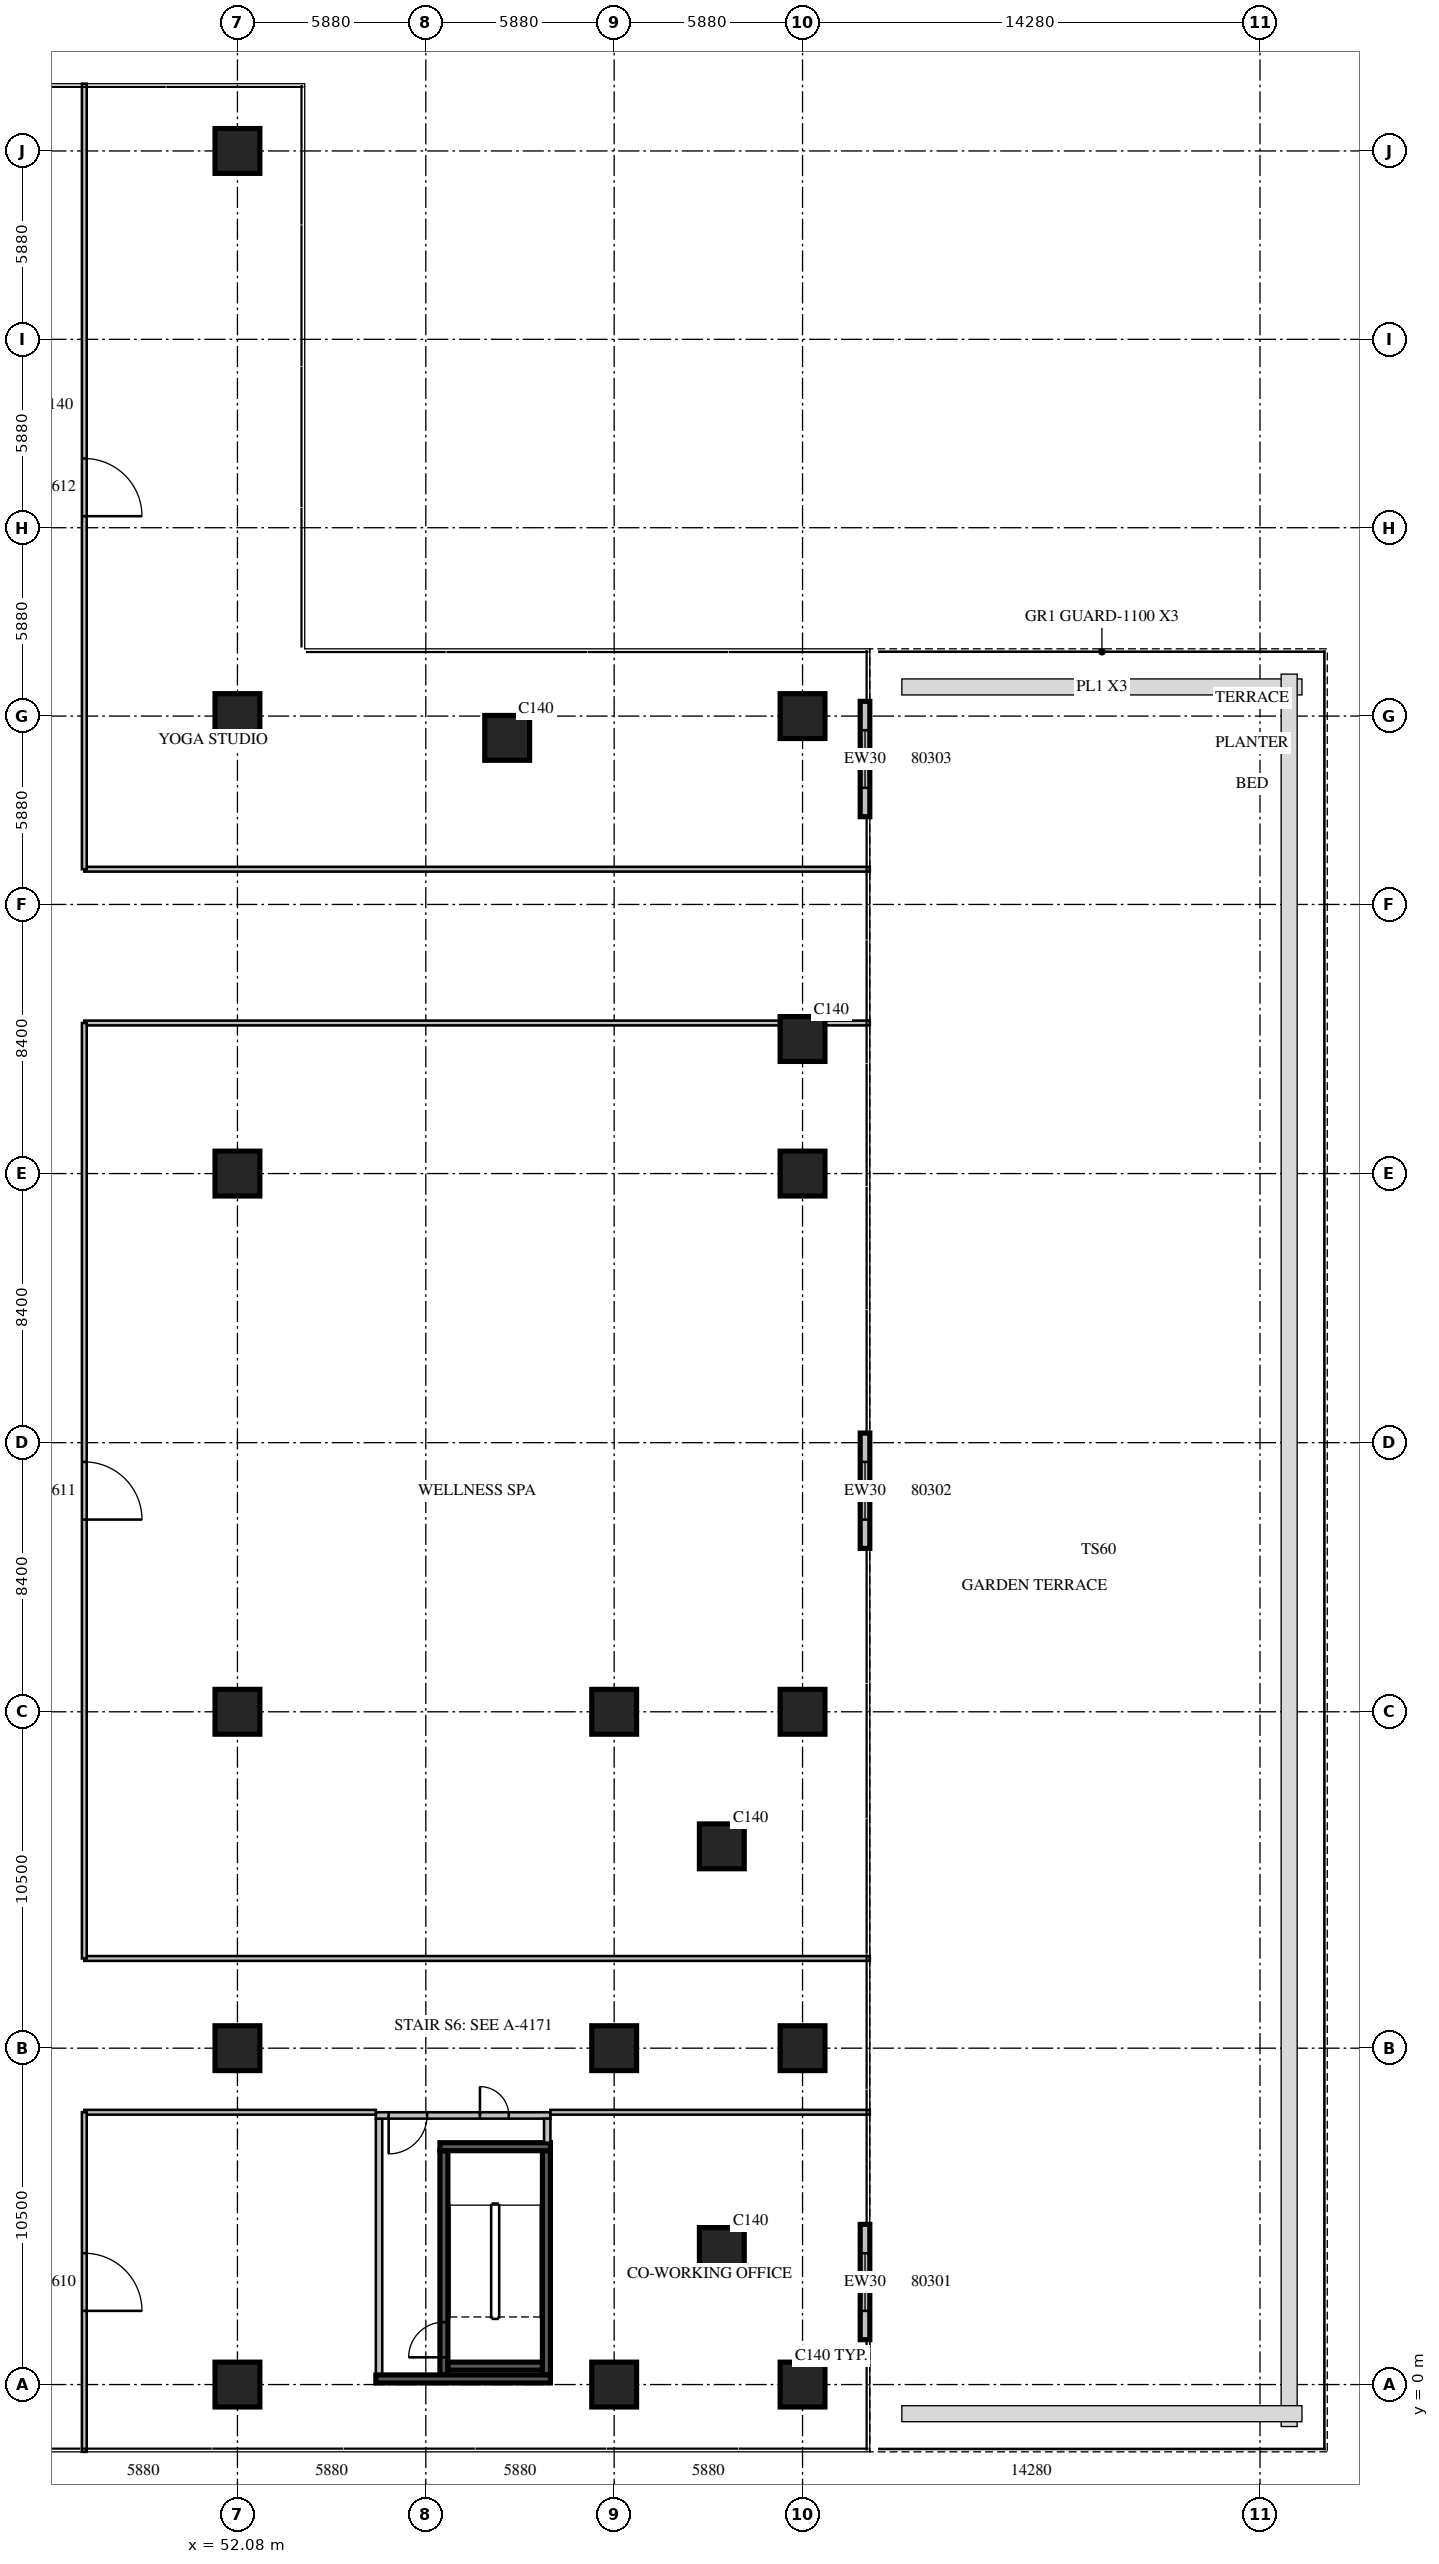
"""IFC4 building model, lengths in metres.
Left out: names, types, materials, properties, quantities, classifications, styles, units other than length and angle.
Written with IfcOpenShell. Run it as: python <this file> out.ifc"""

import sys

from ifc_helpers import new_model, si_unit, direction, frame, frame_2d, origin, origin_2d, place, context, subcontext, project, spatial, rectangle, extrude, source, transform, mapped, element, fill, save


model = new_model("IFC4")
c1 = context("Model", 3, precision=1e-05, world=origin(), true_north=direction((0.0, 1.0)))
c2 = subcontext(c1, "Body", "Model", "MODEL_VIEW")
j1 = project(units=[si_unit("LENGTHUNIT", "METRE"), si_unit("PLANEANGLEUNIT", "RADIAN")], contexts=[c1])
p1 = place(None, origin())
s1 = spatial("IfcSite", under=j1, at=p1, CompositionType="ELEMENT")
p2 = place(p1, origin())
s2 = spatial("IfcBuilding", under=s1, at=p2, CompositionType="ELEMENT")
p3 = place(p2, frame((0.0, 0.0, 18.3)))
s3 = spatial("IfcBuildingStorey", under=s2, at=p3, CompositionType="ELEMENT", Elevation=18.3)
m1 = source(origin(), c2, "Body", "SweptSolid", [
    extrude(rectangle(XDim=1.4, YDim=1.4, at=origin_2d()), origin(), (0.0, 0.0, 1.0), 5.4),
])
for number, where, z_axis, x_axis in (
    (1, (52.08, 0.0, 0.0), (0.0, 0.0, 1.0), (1.0, 0.0, 0.0)),
    (2, (52.08, 10.5, 0.0), (0.0, 0.0, 1.0), (1.0, 0.0, 0.0)),
    (3, (52.08, 21.0, 0.0), (0.0, 0.0, 1.0), (1.0, 0.0, 0.0)),
    (4, (52.08, 37.8, 0.0), (0.0, 0.0, 1.0), (1.0, 0.0, 0.0)),
    (5, (52.08, 52.08, 0.0), (0.0, 0.0, 1.0), (1.0, 0.0, 0.0)),
    (6, (52.08, 69.72, 0.0), (0.0, 0.0, 1.0), (1.0, 0.0, 0.0)),
    (7, (60.5, 51.4, 0.0), (0.0, 0.0, 1.0), (1.0, 0.0, 0.0)),
    (8, (63.84, 0.0, 0.0), (0.0, 0.0, 1.0), (1.0, 0.0, 0.0)),
    (9, (63.84, 10.5, 0.0), (0.0, 0.0, 1.0), (1.0, 0.0, 0.0)),
    (10, (63.84, 21.0, 0.0), (0.0, 0.0, 1.0), (1.0, 0.0, 0.0)),
    (11, (67.2, 4.2, 0.0), (0.0, 0.0, 1.0), (1.0, 0.0, 0.0)),
    (12, (67.2, 16.8, 0.0), (0.0, 0.0, 1.0), (1.0, 0.0, 0.0)),
    (13, (69.72, 0.0, 0.0), (0.0, 0.0, 1.0), (1.0, 0.0, 0.0)),
    (14, (69.72, 10.5, 0.0), (0.0, 0.0, 1.0), (1.0, 0.0, 0.0)),
    (15, (69.72, 21.0, 0.0), (0.0, 0.0, 1.0), (1.0, 0.0, 0.0)),
    (16, (69.72, 37.8, 0.0), (0.0, 0.0, 1.0), (1.0, 0.0, 0.0)),
    (17, (69.72, 42.0, 0.0), (0.0, 0.0, 1.0), (1.0, 0.0, 0.0)),
    (18, (69.72, 52.08, 0.0), (0.0, 0.0, 1.0), (1.0, 0.0, 0.0)),
):
    element("IfcColumn", number, at=place(p3, frame(where, z_axis=z_axis, x_axis=x_axis)), inside=s3, PredefinedType="COLUMN", context=c2, shape_type="MappedRepresentation", body=[
        mapped(m1, transform((0.0, 0.0, 0.0), scale=1.0)),
    ])
m2 = source(origin(), c2, "Body", "SweptSolid", [
    extrude(rectangle(XDim=3.6, YDim=0.3, at=frame_2d((1.8, 0.0))), origin(), (0.0, 0.0, 1.0), 4.8),
])
p4 = place(p3, frame((71.67, 1.4, 0.0), z_axis=(0.0, 0.0, 1.0), x_axis=(0.0, 1.0, 0.0)))
e19 = element("IfcWall", 19, at=p4, inside=s3, PredefinedType="STANDARD", context=c2, shape_type="MappedRepresentation", body=[
    mapped(m2, transform((0.0, 0.0, 0.0), scale=1.0)),
])
m3 = source(origin(), c2, "Body", "SweptSolid", [
    extrude(rectangle(XDim=1.8, YDim=2.4, at=frame_2d((0.9, 1.2))), frame((0.0, 0.16, 0.0), z_axis=(0.0, -1.0, 0.0), x_axis=(1.0, 0.0, 0.0)), (0.0, 0.0, 1.0), 0.32),
])
p5 = place(p4, frame((0.9, 0.0, 0.0)))
e20 = element("IfcOpeningElement", 20, at=p5, cuts=e19, PredefinedType="OPENING", context=c2, shape_type="MappedRepresentation", body=[
    mapped(m3, transform((0.0, 0.0, 0.0), scale=1.0)),
])
p6 = place(p3, frame((71.67, 26.1, 0.0), z_axis=(0.0, 0.0, 1.0), x_axis=(0.0, 1.0, 0.0)))
e21 = element("IfcWall", 21, at=p6, inside=s3, PredefinedType="STANDARD", context=c2, shape_type="MappedRepresentation", body=[
    mapped(m2, transform((0.0, 0.0, 0.0), scale=1.0)),
])
p7 = place(p6, frame((0.9, 0.0, 0.0)))
e22 = element("IfcOpeningElement", 22, at=p7, cuts=e21, PredefinedType="OPENING", context=c2, shape_type="MappedRepresentation", body=[
    mapped(m3, transform((0.0, 0.0, 0.0), scale=1.0)),
])
p8 = place(p3, frame((71.67, 48.94, 0.0), z_axis=(0.0, 0.0, 1.0), x_axis=(0.0, 1.0, 0.0)))
e23 = element("IfcWall", 23, at=p8, inside=s3, PredefinedType="STANDARD", context=c2, shape_type="MappedRepresentation", body=[
    mapped(m2, transform((0.0, 0.0, 0.0), scale=1.0)),
])
p9 = place(p8, frame((0.9, 0.0, 0.0)))
e24 = element("IfcOpeningElement", 24, at=p9, cuts=e23, PredefinedType="OPENING", context=c2, shape_type="MappedRepresentation", body=[
    mapped(m3, transform((0.0, 0.0, 0.0), scale=1.0)),
])
m4 = source(origin(), c2, "Body", "SweptSolid", [
    extrude(rectangle(XDim=7.0, YDim=0.25, at=frame_2d((3.5, 0.0))), origin(), (0.0, 0.0, 1.0), 4.8),
])
p10 = place(p3, frame((58.525, 0.3, 0.0), z_axis=(0.0, 0.0, 1.0), x_axis=(0.0, 1.0, 0.0)))
e25 = element("IfcWall", 25, at=p10, inside=s3, PredefinedType="SOLIDWALL", context=c2, shape_type="MappedRepresentation", body=[
    mapped(m4, transform((0.0, 0.0, 0.0), scale=1.0)),
])
m5 = source(origin(), c2, "Body", "SweptSolid", [
    extrude(rectangle(XDim=1.1, YDim=2.1, at=frame_2d((0.55, 1.05))), frame((0.0, 0.135, 0.0), z_axis=(0.0, -1.0, 0.0), x_axis=(1.0, 0.0, 0.0)), (0.0, 0.0, 1.0), 0.27),
])
p11 = place(p10, frame((0.55, 0.0, 0.0)))
e26 = element("IfcOpeningElement", 26, at=p11, cuts=e25, PredefinedType="OPENING", context=c2, shape_type="MappedRepresentation", body=[
    mapped(m5, transform((0.0, 0.0, 0.0), scale=1.0)),
])
p12 = place(p3, frame((61.725, 0.3, 0.0), z_axis=(0.0, 0.0, 1.0), x_axis=(0.0, 1.0, 0.0)))
e27 = element("IfcWall", 27, at=p12, inside=s3, PredefinedType="SOLIDWALL", context=c2, shape_type="MappedRepresentation", body=[
    mapped(m4, transform((0.0, 0.0, 0.0), scale=1.0)),
])
m6 = source(origin(), c2, "Body", "SweptSolid", [
    extrude(rectangle(XDim=3.45, YDim=0.25, at=frame_2d((1.725, 0.0))), origin(), (0.0, 0.0, 1.0), 4.8),
])
p13 = place(p3, frame((58.4, 7.425, 0.0), z_axis=(0.0, 0.0, 1.0), x_axis=(1.0, 0.0, 0.0)))
e28 = element("IfcWall", 28, at=p13, inside=s3, PredefinedType="SOLIDWALL", context=c2, shape_type="MappedRepresentation", body=[
    mapped(m6, transform((0.0, 0.0, 0.0), scale=1.0)),
])
m7 = source(origin(), c2, "Body", "SweptSolid", [
    extrude(rectangle(XDim=2.95, YDim=0.25, at=frame_2d((1.475, 0.0))), origin(), (0.0, 0.0, 1.0), 4.8),
])
p14 = place(p3, frame((58.65, 0.575, 0.0), z_axis=(0.0, 0.0, 1.0), x_axis=(1.0, 0.0, 0.0)))
e29 = element("IfcWall", 29, at=p14, inside=s3, PredefinedType="SOLIDWALL", context=c2, shape_type="MappedRepresentation", body=[
    mapped(m7, transform((0.0, 0.0, 0.0), scale=1.0)),
])
m8 = source(origin(), c2, "Body", "SweptSolid", [
    extrude(rectangle(XDim=8.0, YDim=0.2, at=frame_2d((4.0, 0.0))), origin(), (0.0, 0.0, 1.0), 4.8),
])
p15 = place(p3, frame((56.5, 0.3, 0.0), z_axis=(0.0, 0.0, 1.0), x_axis=(0.0, 1.0, 0.0)))
e30 = element("IfcWall", 30, at=p15, inside=s3, PredefinedType="PARTITIONING", context=c2, shape_type="MappedRepresentation", body=[
    mapped(m8, transform((0.0, 0.0, 0.0), scale=1.0)),
])
m9 = source(origin(), c2, "Body", "SweptSolid", [
    extrude(rectangle(XDim=5.45, YDim=0.2, at=frame_2d((2.725, 0.0))), origin(), (0.0, 0.0, 1.0), 4.8),
])
p16 = place(p3, frame((56.4, 8.4, 0.0), z_axis=(0.0, 0.0, 1.0), x_axis=(1.0, 0.0, 0.0)))
e31 = element("IfcWall", 31, at=p16, inside=s3, PredefinedType="PARTITIONING", context=c2, shape_type="MappedRepresentation", body=[
    mapped(m9, transform((0.0, 0.0, 0.0), scale=1.0)),
])
m10 = source(origin(), c2, "Body", "SweptSolid", [
    extrude(rectangle(XDim=1.2, YDim=2.1, at=frame_2d((0.6, 1.05))), frame((0.0, 0.11, 0.0), z_axis=(0.0, -1.0, 0.0), x_axis=(1.0, 0.0, 0.0)), (0.0, 0.0, 1.0), 0.22),
])
p17 = place(p16, frame((0.4, 0.0, 0.0)))
e32 = element("IfcOpeningElement", 32, at=p17, cuts=e31, PredefinedType="OPENING", context=c2, shape_type="MappedRepresentation", body=[
    mapped(m10, transform((0.0, 0.0, 0.0), scale=1.0)),
])
m11 = source(origin(), c2, "Body", "SweptSolid", [
    extrude(rectangle(XDim=0.9, YDim=2.1, at=frame_2d((0.45, 1.05))), frame((0.0, 0.11, 0.0), z_axis=(0.0, -1.0, 0.0), x_axis=(1.0, 0.0, 0.0)), (0.0, 0.0, 1.0), 0.22),
])
p18 = place(p16, frame((3.25, 0.0, 0.0)))
e33 = element("IfcOpeningElement", 33, at=p18, cuts=e31, PredefinedType="OPENING", context=c2, shape_type="MappedRepresentation", body=[
    mapped(m11, transform((0.0, 0.0, 0.0), scale=1.0)),
])
m12 = source(origin(), c2, "Body", "SweptSolid", [
    extrude(rectangle(XDim=0.75, YDim=0.2, at=frame_2d((0.375, 0.0))), origin(), (0.0, 0.0, 1.0), 4.8),
])
p19 = place(p3, frame((61.75, 7.55, 0.0), z_axis=(0.0, 0.0, 1.0), x_axis=(0.0, 1.0, 0.0)))
e34 = element("IfcWall", 34, at=p19, inside=s3, PredefinedType="PARTITIONING", context=c2, shape_type="MappedRepresentation", body=[
    mapped(m12, transform((0.0, 0.0, 0.0), scale=1.0)),
])
m13 = source(origin(), c2, "Body", "SweptSolid", [
    extrude(rectangle(XDim=5.45, YDim=0.25, at=frame_2d((2.725, 0.0))), origin(), (0.0, 0.0, 1.0), 4.8),
])
p20 = place(p3, frame((56.4, 0.175, 0.0), z_axis=(0.0, 0.0, 1.0), x_axis=(1.0, 0.0, 0.0)))
e35 = element("IfcWall", 35, at=p20, inside=s3, PredefinedType="SOLIDWALL", context=c2, shape_type="MappedRepresentation", body=[
    mapped(m13, transform((0.0, 0.0, 0.0), scale=1.0)),
])
m14 = source(origin(), c2, "Body", "SweptSolid", [
    extrude(rectangle(XDim=9.1, YDim=0.15, at=frame_2d((4.55, 0.0))), origin(), (0.0, 0.0, 1.0), 4.8),
])
p21 = place(p3, frame((47.3, 8.5, 0.0), z_axis=(0.0, 0.0, 1.0), x_axis=(1.0, 0.0, 0.0)))
e36 = element("IfcWall", 36, at=p21, inside=s3, PredefinedType="PARTITIONING", context=c2, shape_type="MappedRepresentation", body=[
    mapped(m14, transform((0.0, 0.0, 0.0), scale=1.0)),
])
p22 = place(p3, frame((61.85, 8.5, 0.0), z_axis=(0.0, 0.0, 1.0), x_axis=(1.0, 0.0, 0.0)))
e37 = element("IfcWall", 37, at=p22, inside=s3, PredefinedType="PARTITIONING", context=c2, shape_type="SweptSolid", body=[
    extrude(rectangle(XDim=9.97, YDim=0.15, at=frame_2d((4.985, 0.0))), origin(), (0.0, 0.0, 1.0), 4.8),
])
m15 = source(origin(), c2, "Body", "SweptSolid", [
    extrude(rectangle(XDim=24.52, YDim=0.15, at=frame_2d((12.26, 0.0))), origin(), (0.0, 0.0, 1.0), 4.8),
])
for number, where, z_axis, x_axis in (
    (38, (47.3, 13.3, 0.0), (0.0, 0.0, 1.0), (1.0, 0.0, 0.0)),
    (39, (47.3, 42.5, 0.0), (0.0, 0.0, 1.0), (1.0, 0.0, 0.0)),
    (40, (47.3, 47.3, 0.0), (0.0, 0.0, 1.0), (1.0, 0.0, 0.0)),
):
    element("IfcWall", number, at=place(p3, frame(where, z_axis=z_axis, x_axis=x_axis)), inside=s3, PredefinedType="PARTITIONING", context=c2, shape_type="MappedRepresentation", body=[
        mapped(m15, transform((0.0, 0.0, 0.0), scale=1.0)),
    ])
m16 = source(origin(), c2, "Body", "SweptSolid", [
    extrude(rectangle(XDim=10.6, YDim=0.15, at=frame_2d((5.3, 0.0))), origin(), (0.0, 0.0, 1.0), 4.8),
])
p23 = place(p3, frame((47.3, -2.1, 0.0), z_axis=(0.0, 0.0, 1.0), x_axis=(0.0, 1.0, 0.0)))
e41 = element("IfcWall", 41, at=p23, inside=s3, PredefinedType="PARTITIONING", context=c2, shape_type="MappedRepresentation", body=[
    mapped(m16, transform((0.0, 0.0, 0.0), scale=1.0)),
])
m17 = source(origin(), c2, "Body", "SweptSolid", [
    extrude(rectangle(XDim=1.8, YDim=2.1, at=frame_2d((0.9, 1.05))), frame((0.0, 0.085, 0.0), z_axis=(0.0, -1.0, 0.0), x_axis=(1.0, 0.0, 0.0)), (0.0, 0.0, 1.0), 0.17),
])
p24 = place(p23, frame((4.4, 0.0, 0.0)))
e42 = element("IfcOpeningElement", 42, at=p24, cuts=e41, PredefinedType="OPENING", context=c2, shape_type="MappedRepresentation", body=[
    mapped(m17, transform((0.0, 0.0, 0.0), scale=1.0)),
])
m18 = source(origin(), c2, "Body", "SweptSolid", [
    extrude(rectangle(XDim=29.2, YDim=0.15, at=frame_2d((14.6, 0.0))), origin(), (0.0, 0.0, 1.0), 4.8),
])
p25 = place(p3, frame((47.3, 13.3, 0.0), z_axis=(0.0, 0.0, 1.0), x_axis=(0.0, 1.0, 0.0)))
e43 = element("IfcWall", 43, at=p25, inside=s3, PredefinedType="PARTITIONING", context=c2, shape_type="MappedRepresentation", body=[
    mapped(m18, transform((0.0, 0.0, 0.0), scale=1.0)),
])
p26 = place(p25, frame((13.7, 0.0, 0.0)))
e44 = element("IfcOpeningElement", 44, at=p26, cuts=e43, PredefinedType="OPENING", context=c2, shape_type="MappedRepresentation", body=[
    mapped(m17, transform((0.0, 0.0, 0.0), scale=1.0)),
])
p27 = place(p3, frame((47.3, 47.3, 0.0), z_axis=(0.0, 0.0, 1.0), x_axis=(0.0, 1.0, 0.0)))
e45 = element("IfcWall", 45, at=p27, inside=s3, PredefinedType="PARTITIONING", context=c2, shape_type="MappedRepresentation", body=[
    mapped(m15, transform((0.0, 0.0, 0.0), scale=1.0)),
])
p28 = place(p27, frame((11.02, 0.0, 0.0)))
e46 = element("IfcOpeningElement", 46, at=p28, cuts=e45, PredefinedType="OPENING", context=c2, shape_type="MappedRepresentation", body=[
    mapped(m17, transform((0.0, 0.0, 0.0), scale=1.0)),
])
m19 = source(origin(), c2, "Body", "SweptSolid", [
    extrude(rectangle(XDim=1.8, YDim=2.4, at=frame_2d((0.9, 1.2))), frame((0.0, 0.025, 0.0), z_axis=(0.0, -1.0, 0.0), x_axis=(1.0, 0.0, 0.0)), (0.0, 0.0, 1.0), 0.05),
])
p29 = place(p5, origin())
e47 = element("IfcDoor", 47, at=p29, inside=s3, OperationType="SLIDING_TO_LEFT", PredefinedType="DOOR", context=c2, shape_type="MappedRepresentation", body=[
    mapped(m19, transform((0.0, 0.0, 0.0), scale=1.0)),
])
fill(e20, e47)
p30 = place(p7, origin())
e48 = element("IfcDoor", 48, at=p30, inside=s3, OperationType="SLIDING_TO_LEFT", PredefinedType="DOOR", context=c2, shape_type="MappedRepresentation", body=[
    mapped(m19, transform((0.0, 0.0, 0.0), scale=1.0)),
])
fill(e22, e48)
p31 = place(p9, origin())
e49 = element("IfcDoor", 49, at=p31, inside=s3, OperationType="SLIDING_TO_LEFT", PredefinedType="DOOR", context=c2, shape_type="MappedRepresentation", body=[
    mapped(m19, transform((0.0, 0.0, 0.0), scale=1.0)),
])
fill(e24, e49)
m20 = source(origin(), c2, "Body", "SweptSolid", [
    extrude(rectangle(XDim=1.1, YDim=2.1, at=frame_2d((0.55, 1.05))), frame((0.0, 0.025, 0.0), z_axis=(0.0, -1.0, 0.0), x_axis=(1.0, 0.0, 0.0)), (0.0, 0.0, 1.0), 0.05),
])
p32 = place(p11, origin())
e50 = element("IfcDoor", 50, at=p32, inside=s3, OperationType="SINGLE_SWING_LEFT", PredefinedType="DOOR", context=c2, shape_type="MappedRepresentation", body=[
    mapped(m20, transform((0.0, 0.0, 0.0), scale=1.0)),
])
fill(e26, e50)
m21 = source(origin(), c2, "Body", "SweptSolid", [
    extrude(rectangle(XDim=1.2, YDim=2.1, at=frame_2d((0.6, 1.05))), frame((0.0, 0.025, 0.0), z_axis=(0.0, -1.0, 0.0), x_axis=(1.0, 0.0, 0.0)), (0.0, 0.0, 1.0), 0.05),
])
p33 = place(p17, origin())
e51 = element("IfcDoor", 51, at=p33, inside=s3, OperationType="SINGLE_SWING_RIGHT", PredefinedType="DOOR", context=c2, shape_type="MappedRepresentation", body=[
    mapped(m21, transform((0.0, 0.0, 0.0), scale=1.0)),
])
fill(e32, e51)
m22 = source(origin(), c2, "Body", "SweptSolid", [
    extrude(rectangle(XDim=0.9, YDim=2.1, at=frame_2d((0.45, 1.05))), frame((0.0, 0.025, 0.0), z_axis=(0.0, -1.0, 0.0), x_axis=(1.0, 0.0, 0.0)), (0.0, 0.0, 1.0), 0.05),
])
p34 = place(p18, origin())
e52 = element("IfcDoor", 52, at=p34, inside=s3, OperationType="SINGLE_SWING_LEFT", PredefinedType="DOOR", context=c2, shape_type="MappedRepresentation", body=[
    mapped(m22, transform((0.0, 0.0, 0.0), scale=1.0)),
])
fill(e33, e52)
m23 = source(origin(), c2, "Body", "SweptSolid", [
    extrude(rectangle(XDim=1.8, YDim=2.1, at=frame_2d((0.9, 1.05))), frame((0.0, 0.025, 0.0), z_axis=(0.0, -1.0, 0.0), x_axis=(1.0, 0.0, 0.0)), (0.0, 0.0, 1.0), 0.05),
])
p35 = place(p24, origin())
e53 = element("IfcDoor", 53, at=p35, inside=s3, OperationType="DOUBLE_DOOR_SINGLE_SWING", PredefinedType="DOOR", context=c2, shape_type="MappedRepresentation", body=[
    mapped(m23, transform((0.0, 0.0, 0.0), scale=1.0)),
])
fill(e42, e53)
p36 = place(p26, origin())
e54 = element("IfcDoor", 54, at=p36, inside=s3, OperationType="DOUBLE_DOOR_SINGLE_SWING", PredefinedType="DOOR", context=c2, shape_type="MappedRepresentation", body=[
    mapped(m23, transform((0.0, 0.0, 0.0), scale=1.0)),
])
fill(e44, e54)
p37 = place(p28, origin())
e55 = element("IfcDoor", 55, at=p37, inside=s3, OperationType="DOUBLE_DOOR_SINGLE_SWING", PredefinedType="DOOR", context=c2, shape_type="MappedRepresentation", body=[
    mapped(m23, transform((0.0, 0.0, 0.0), scale=1.0)),
])
fill(e46, e55)
save(model, sys.argv[1])
